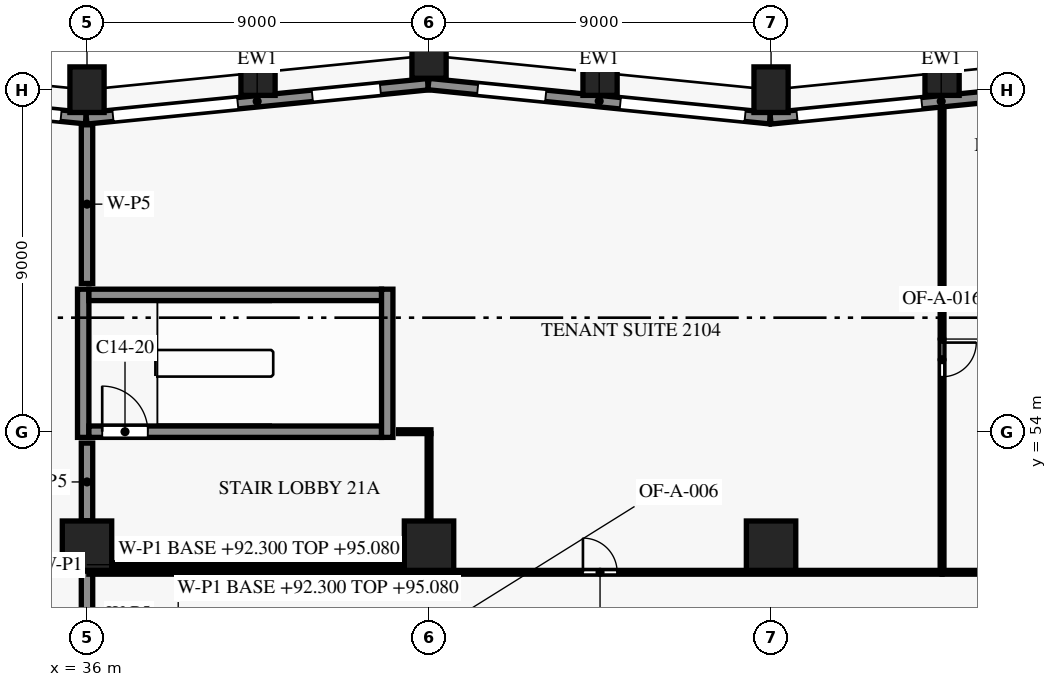
"""IFC4 building model, lengths in metres.
Left out: names, types, materials, properties, quantities, classifications, styles, units other than length and angle.
Written with IfcOpenShell. Run it as: python <this file> out.ifc"""

import sys

from ifc_helpers import new_model, si_unit, direction, frame, frame_2d, origin, origin_2d, place, context, subcontext, project, spatial, rectangle, extrude, element, fill, save


model = new_model("IFC4")
c1 = context("Model", 3, precision=1e-05, world=origin(), true_north=direction((0.0, 1.0)))
c2 = subcontext(c1, "Body", "Model", "MODEL_VIEW")
j1 = project(units=[si_unit("LENGTHUNIT", "METRE"), si_unit("PLANEANGLEUNIT", "RADIAN")], contexts=[c1])
p1 = place(None, origin())
s1 = spatial("IfcSite", under=j1, at=p1, CompositionType="ELEMENT")
p2 = place(p1, origin())
s2 = spatial("IfcBuilding", under=s1, at=p2, CompositionType="ELEMENT")
p3 = place(p2, frame((0.0, 0.0, 92.3)))
s3 = spatial("IfcBuildingStorey", under=s2, at=p3, CompositionType="ELEMENT", Elevation=92.3)
for number, where, z_axis, x_axis in (
    (1, (58.5, 63.45, 0.0), (0.0, 0.0, 1.0), (-0.995, -0.1, 0.0)),
    (2, (54.0, 63.0, 0.0), (0.0, 0.0, 1.0), (-1.0, 0.0, 0.0)),
    (3, (49.5, 63.45, 0.0), (0.0, 0.0, 1.0), (-0.995, 0.1, 0.0)),
    (4, (45.0, 63.9, 0.0), (0.0, 0.0, 1.0), (-1.0, 0.0, 0.0)),
    (5, (40.5, 63.45, 0.0), (0.0, 0.0, 1.0), (-0.995, -0.1, 0.0)),
    (6, (36.0, 63.0, 0.0), (0.0, 0.0, 1.0), (-1.0, 0.0, 0.0)),
):
    element("IfcColumn", number, at=place(p3, frame(where, z_axis=z_axis, x_axis=x_axis)), inside=s3, PredefinedType="COLUMN", context=c2, shape_type="SweptSolid", body=[
        extrude(rectangle(XDim=0.9, YDim=1.2, at=origin_2d()), origin(), (0.0, 0.0, 1.0), 3.8),
    ])
for number, where, z_axis, x_axis in (
    (7, (36.0, 51.0, 0.0), (0.0, 0.0, 1.0), (1.0, 0.0, 0.0)),
    (8, (45.0, 51.0, 0.0), (0.0, 0.0, 1.0), (1.0, 0.0, 0.0)),
    (9, (54.0, 51.0, 0.0), (0.0, 0.0, 1.0), (1.0, 0.0, 0.0)),
):
    element("IfcColumn", number, at=place(p3, frame(where, z_axis=z_axis, x_axis=x_axis)), inside=s3, PredefinedType="COLUMN", context=c2, shape_type="SweptSolid", body=[
        extrude(rectangle(XDim=1.3, YDim=1.3, at=origin_2d()), origin(), (0.0, 0.0, 1.0), 3.8),
    ])
p4 = place(p3, frame((53.985, 62.245, 0.0), z_axis=(0.0, 0.0, 1.0), x_axis=(0.995037993253, 0.099495688264, 0.0)))
e10 = element("IfcWall", 10, at=p4, inside=s3, PredefinedType="SOLIDWALL", context=c2, shape_type="SweptSolid", body=[
    extrude(rectangle(XDim=9.03, YDim=0.3, at=frame_2d((4.515, 0.0))), origin(), (0.0, 0.0, 1.0), 3.15),
])
p5 = place(p4, frame((0.701, 0.0, 0.15)))
e11 = element("IfcOpeningElement", 11, at=p5, cuts=e10, PredefinedType="OPENING", context=c2, shape_type="SweptSolid", body=[
    extrude(rectangle(XDim=3.3, YDim=2.4, at=frame_2d((1.65, 1.2))), frame((0.0, 0.16, 0.0), z_axis=(0.0, -1.0, 0.0), x_axis=(1.0, 0.0, 0.0)), (0.0, 0.0, 1.0), 0.32),
])
p6 = place(p4, frame((5.974, 0.0, 0.75)))
e12 = element("IfcOpeningElement", 12, at=p6, cuts=e10, PredefinedType="OPENING", context=c2, shape_type="SweptSolid", body=[
    extrude(rectangle(XDim=1.8, YDim=1.8, at=frame_2d((0.9, 0.9))), frame((0.0, 0.16, 0.0), z_axis=(0.0, -1.0, 0.0), x_axis=(1.0, 0.0, 0.0)), (0.0, 0.0, 1.0), 0.32),
])
p7 = place(p3, frame((44.985, 63.148, 0.0), z_axis=(0.0, 0.0, 1.0), x_axis=(0.995037993253, -0.099495688264, 0.0)))
e13 = element("IfcWall", 13, at=p7, inside=s3, PredefinedType="SOLIDWALL", context=c2, shape_type="SweptSolid", body=[
    extrude(rectangle(XDim=9.03, YDim=0.3, at=frame_2d((4.515, 0.0))), origin(), (0.0, 0.0, 1.0), 3.15),
])
p8 = place(p7, frame((1.301, 0.0, 0.75)))
e14 = element("IfcOpeningElement", 14, at=p8, cuts=e13, PredefinedType="OPENING", context=c2, shape_type="SweptSolid", body=[
    extrude(rectangle(XDim=1.8, YDim=1.8, at=frame_2d((0.9, 0.9))), frame((0.0, 0.16, 0.0), z_axis=(0.0, -1.0, 0.0), x_axis=(1.0, 0.0, 0.0)), (0.0, 0.0, 1.0), 0.32),
])
p9 = place(p7, frame((5.073, 0.0, 0.15)))
e15 = element("IfcOpeningElement", 15, at=p9, cuts=e13, PredefinedType="OPENING", context=c2, shape_type="SweptSolid", body=[
    extrude(rectangle(XDim=3.3, YDim=2.4, at=frame_2d((1.65, 1.2))), frame((0.0, 0.16, 0.0), z_axis=(0.0, -1.0, 0.0), x_axis=(1.0, 0.0, 0.0)), (0.0, 0.0, 1.0), 0.32),
])
p10 = place(p3, frame((35.985, 62.245, 0.0), z_axis=(0.0, 0.0, 1.0), x_axis=(0.995037993253, 0.099495688264, 0.0)))
e16 = element("IfcWall", 16, at=p10, inside=s3, PredefinedType="SOLIDWALL", context=c2, shape_type="SweptSolid", body=[
    extrude(rectangle(XDim=9.03, YDim=0.3, at=frame_2d((4.515, 0.0))), origin(), (0.0, 0.0, 1.0), 3.15),
])
p11 = place(p10, frame((0.701, 0.0, 0.15)))
e17 = element("IfcOpeningElement", 17, at=p11, cuts=e16, PredefinedType="OPENING", context=c2, shape_type="SweptSolid", body=[
    extrude(rectangle(XDim=3.3, YDim=2.4, at=frame_2d((1.65, 1.2))), frame((0.0, 0.16, 0.0), z_axis=(0.0, -1.0, 0.0), x_axis=(1.0, 0.0, 0.0)), (0.0, 0.0, 1.0), 0.32),
])
p12 = place(p10, frame((5.974, 0.0, 0.75)))
e18 = element("IfcOpeningElement", 18, at=p12, cuts=e16, PredefinedType="OPENING", context=c2, shape_type="SweptSolid", body=[
    extrude(rectangle(XDim=1.8, YDim=1.8, at=frame_2d((0.9, 0.9))), frame((0.0, 0.16, 0.0), z_axis=(0.0, -1.0, 0.0), x_axis=(1.0, 0.0, 0.0)), (0.0, 0.0, 1.0), 0.32),
])
p13 = place(p3, frame((27.075, 63.139, 0.0), z_axis=(0.0, 0.0, 1.0), x_axis=(0.995036108601, -0.099514534519, 0.0)))
e19 = element("IfcWall", 19, at=p13, inside=s3, PredefinedType="SOLIDWALL", context=c2, shape_type="SweptSolid", body=[
    extrude(rectangle(XDim=8.94, YDim=0.3, at=frame_2d((4.47, 0.0))), origin(), (0.0, 0.0, 1.0), 3.15),
])
p14 = place(p13, frame((1.211, 0.0, 0.75)))
e20 = element("IfcOpeningElement", 20, at=p14, cuts=e19, PredefinedType="OPENING", context=c2, shape_type="SweptSolid", body=[
    extrude(rectangle(XDim=1.8, YDim=1.8, at=frame_2d((0.9, 0.9))), frame((0.0, 0.16, 0.0), z_axis=(0.0, -1.0, 0.0), x_axis=(1.0, 0.0, 0.0)), (0.0, 0.0, 1.0), 0.32),
])
p15 = place(p13, frame((4.984, 0.0, 0.15)))
e21 = element("IfcOpeningElement", 21, at=p15, cuts=e19, PredefinedType="OPENING", context=c2, shape_type="SweptSolid", body=[
    extrude(rectangle(XDim=3.3, YDim=2.4, at=frame_2d((1.65, 1.2))), frame((0.0, 0.16, 0.0), z_axis=(0.0, -1.0, 0.0), x_axis=(1.0, 0.0, 0.0)), (0.0, 0.0, 1.0), 0.32),
])
p16 = place(p3, frame((36.05, 54.0, 0.0), z_axis=(0.0, 0.0, 1.0), x_axis=(1.0, 0.0, 0.0)))
e22 = element("IfcWall", 22, at=p16, inside=s3, PredefinedType="SHEAR", context=c2, shape_type="SweptSolid", body=[
    extrude(rectangle(XDim=7.7, YDim=0.3, at=frame_2d((3.85, 0.0))), origin(), (0.0, 0.0, 1.0), 3.5),
])
p17 = place(p16, frame((0.35, 0.0, 0.0)))
e23 = element("IfcOpeningElement", 23, at=p17, cuts=e22, PredefinedType="OPENING", context=c2, shape_type="SweptSolid", body=[
    extrude(rectangle(XDim=1.2, YDim=2.2, at=frame_2d((0.6, 1.1))), frame((0.0, 0.16, 0.0), z_axis=(0.0, -1.0, 0.0), x_axis=(1.0, 0.0, 0.0)), (0.0, 0.0, 1.0), 0.32),
])
p18 = place(p3, frame((36.05, 57.6, 0.0), z_axis=(0.0, 0.0, 1.0), x_axis=(1.0, 0.0, 0.0)))
e24 = element("IfcWall", 24, at=p18, inside=s3, PredefinedType="SHEAR", context=c2, shape_type="SweptSolid", body=[
    extrude(rectangle(XDim=7.7, YDim=0.3, at=frame_2d((3.85, 0.0))), origin(), (0.0, 0.0, 1.0), 3.5),
])
for number, where, z_axis, x_axis in (
    (25, (35.9, 53.85, 0.0), (0.0, 0.0, 1.0), (0.0, 1.0, 0.0)),
    (26, (43.9, 53.85, 0.0), (0.0, 0.0, 1.0), (0.0, 1.0, 0.0)),
):
    element("IfcWall", number, at=place(p3, frame(where, z_axis=z_axis, x_axis=x_axis)), inside=s3, PredefinedType="SHEAR", context=c2, shape_type="SweptSolid", body=[
        extrude(rectangle(XDim=3.9, YDim=0.3, at=frame_2d((1.95, 0.0))), origin(), (0.0, 0.0, 1.0), 3.5),
    ])
p19 = place(p3, frame((36.0, 48.05, 0.0), z_axis=(0.0, 0.0, 1.0), x_axis=(0.0, 1.0, 0.0)))
e27 = element("IfcWall", 27, at=p19, inside=s3, PredefinedType="PARTITIONING", context=c2, shape_type="SweptSolid", body=[
    extrude(rectangle(XDim=2.28, YDim=0.3, at=frame_2d((1.14, 0.0))), origin(), (0.0, 0.0, 1.0), 2.78),
])
p20 = place(p3, frame((36.05, 50.3, 0.0), z_axis=(0.0, 0.0, 1.0), x_axis=(1.0, 0.0, 0.0)))
e28 = element("IfcWall", 28, at=p20, inside=s3, PredefinedType="PARTITIONING", context=c2, shape_type="SweptSolid", body=[
    extrude(rectangle(XDim=8.95, YDim=0.1, at=frame_2d((4.475, 0.0))), origin(), (0.0, 0.0, 1.0), 2.78),
])
p21 = place(p3, frame((45.0, 50.3, 0.0), z_axis=(0.0, 0.0, 1.0), x_axis=(1.0, 0.0, 0.0)))
e29 = element("IfcWall", 29, at=p21, inside=s3, PredefinedType="PARTITIONING", context=c2, shape_type="SweptSolid", body=[
    extrude(rectangle(XDim=13.5, YDim=0.1, at=frame_2d((6.75, 0.0))), origin(), (0.0, 0.0, 1.0), 2.88),
])
p22 = place(p21, frame((4.05, 0.0, 0.0)))
e30 = element("IfcOpeningElement", 30, at=p22, cuts=e29, PredefinedType="OPENING", context=c2, shape_type="SweptSolid", body=[
    extrude(rectangle(XDim=0.9, YDim=2.1, at=frame_2d((0.45, 1.05))), frame((0.0, 0.06, 0.0), z_axis=(0.0, -1.0, 0.0), x_axis=(1.0, 0.0, 0.0)), (0.0, 0.0, 1.0), 0.12),
])
p23 = place(p3, frame((58.5, 50.3, 0.0), z_axis=(0.0, 0.0, 1.0), x_axis=(1.0, 0.0, 0.0)))
e31 = element("IfcWall", 31, at=p23, inside=s3, PredefinedType="PARTITIONING", context=c2, shape_type="SweptSolid", body=[
    extrude(rectangle(XDim=4.5, YDim=0.1, at=frame_2d((2.25, 0.0))), origin(), (0.0, 0.0, 1.0), 2.88),
])
p24 = place(p3, frame((44.345, 50.5, 0.0), z_axis=(0.0, 0.0, 1.0), x_axis=(-1.0, 0.0, 0.0)))
e32 = element("IfcWall", 32, at=p24, inside=s3, PredefinedType="PARTITIONING", context=c2, shape_type="SweptSolid", body=[
    extrude(rectangle(XDim=7.69, YDim=0.1, at=frame_2d((3.845, 0.0))), origin(), (0.0, 0.0, 1.0), 3.48),
])
p25 = place(p3, frame((36.0, 51.655, 0.0), z_axis=(0.0, 0.0, 1.0), x_axis=(0.0, 1.0, 0.0)))
e33 = element("IfcWall", 33, at=p25, inside=s3, PredefinedType="PARTITIONING", context=c2, shape_type="SweptSolid", body=[
    extrude(rectangle(XDim=2.045, YDim=0.3, at=frame_2d((1.022, 0.0))), origin(), (0.0, 0.0, 1.0), 2.78),
])
p26 = place(p3, frame((45.0, 53.95, 0.0), z_axis=(0.0, 0.0, 1.0), x_axis=(0.0, -1.0, 0.0)))
e34 = element("IfcWall", 34, at=p26, inside=s3, PredefinedType="PARTITIONING", context=c2, shape_type="SweptSolid", body=[
    extrude(rectangle(XDim=2.295, YDim=0.1, at=frame_2d((1.147, 0.0))), origin(), (0.0, 0.0, 1.0), 2.88),
])
p27 = place(p3, frame((44.2, 54.0, 0.0), z_axis=(0.0, 0.0, 1.0), x_axis=(1.0, 0.0, 0.0)))
e35 = element("IfcWall", 35, at=p27, inside=s3, PredefinedType="PARTITIONING", context=c2, shape_type="SweptSolid", body=[
    extrude(rectangle(XDim=0.85, YDim=0.1, at=frame_2d((0.425, 0.0))), origin(), (0.0, 0.0, 1.0), 2.88),
])
p28 = place(p3, frame((36.0, 57.9, 0.0), z_axis=(0.0, 0.0, 1.0), x_axis=(0.0, 1.0, 0.0)))
e36 = element("IfcWall", 36, at=p28, inside=s3, PredefinedType="PARTITIONING", context=c2, shape_type="SweptSolid", body=[
    extrude(rectangle(XDim=4.176, YDim=0.3, at=frame_2d((2.088, 0.0))), origin(), (0.0, 0.0, 1.0), 2.78),
])
p29 = place(p3, frame((58.5, 62.525, 0.0), z_axis=(0.0, 0.0, 1.0), x_axis=(0.0, -1.0, 0.0)))
e37 = element("IfcWall", 37, at=p29, inside=s3, PredefinedType="PARTITIONING", context=c2, shape_type="SweptSolid", body=[
    extrude(rectangle(XDim=12.175, YDim=0.1, at=frame_2d((6.088, 0.0))), origin(), (0.0, 0.0, 1.0), 2.78),
])
p30 = place(p29, frame((6.18, 0.0, 0.0)))
e38 = element("IfcOpeningElement", 38, at=p30, cuts=e37, PredefinedType="OPENING", context=c2, shape_type="SweptSolid", body=[
    extrude(rectangle(XDim=0.9, YDim=2.1, at=frame_2d((0.45, 1.05))), frame((0.0, 0.06, 0.0), z_axis=(0.0, -1.0, 0.0), x_axis=(1.0, 0.0, 0.0)), (0.0, 0.0, 1.0), 0.12),
])
p31 = place(p5, origin())
e39 = element("IfcWindow", 39, at=p31, inside=s3, PartitioningType="SINGLE_PANEL", PredefinedType="WINDOW", context=c2, shape_type="SweptSolid", body=[
    extrude(rectangle(XDim=3.3, YDim=2.4, at=frame_2d((1.65, 1.2))), frame((0.0, 0.03, 0.0), z_axis=(0.0, -1.0, 0.0), x_axis=(1.0, 0.0, 0.0)), (0.0, 0.0, 1.0), 0.06),
])
fill(e11, e39)
p32 = place(p8, origin())
e40 = element("IfcWindow", 40, at=p32, inside=s3, PartitioningType="SINGLE_PANEL", PredefinedType="WINDOW", context=c2, shape_type="SweptSolid", body=[
    extrude(rectangle(XDim=1.8, YDim=1.8, at=frame_2d((0.9, 0.9))), frame((0.0, 0.03, 0.0), z_axis=(0.0, -1.0, 0.0), x_axis=(1.0, 0.0, 0.0)), (0.0, 0.0, 1.0), 0.06),
])
fill(e14, e40)
p33 = place(p9, origin())
e41 = element("IfcWindow", 41, at=p33, inside=s3, PartitioningType="SINGLE_PANEL", PredefinedType="WINDOW", context=c2, shape_type="SweptSolid", body=[
    extrude(rectangle(XDim=3.3, YDim=2.4, at=frame_2d((1.65, 1.2))), frame((0.0, 0.03, 0.0), z_axis=(0.0, -1.0, 0.0), x_axis=(1.0, 0.0, 0.0)), (0.0, 0.0, 1.0), 0.06),
])
fill(e15, e41)
p34 = place(p11, origin())
e42 = element("IfcWindow", 42, at=p34, inside=s3, PartitioningType="SINGLE_PANEL", PredefinedType="WINDOW", context=c2, shape_type="SweptSolid", body=[
    extrude(rectangle(XDim=3.3, YDim=2.4, at=frame_2d((1.65, 1.2))), frame((0.0, 0.03, 0.0), z_axis=(0.0, -1.0, 0.0), x_axis=(1.0, 0.0, 0.0)), (0.0, 0.0, 1.0), 0.06),
])
fill(e17, e42)
p35 = place(p12, origin())
e43 = element("IfcWindow", 43, at=p35, inside=s3, PartitioningType="SINGLE_PANEL", PredefinedType="WINDOW", context=c2, shape_type="SweptSolid", body=[
    extrude(rectangle(XDim=1.8, YDim=1.8, at=frame_2d((0.9, 0.9))), frame((0.0, 0.03, 0.0), z_axis=(0.0, -1.0, 0.0), x_axis=(1.0, 0.0, 0.0)), (0.0, 0.0, 1.0), 0.06),
])
fill(e18, e43)
p36 = place(p15, origin())
e44 = element("IfcWindow", 44, at=p36, inside=s3, PartitioningType="SINGLE_PANEL", PredefinedType="WINDOW", context=c2, shape_type="SweptSolid", body=[
    extrude(rectangle(XDim=3.3, YDim=2.4, at=frame_2d((1.65, 1.2))), frame((0.0, 0.03, 0.0), z_axis=(0.0, -1.0, 0.0), x_axis=(1.0, 0.0, 0.0)), (0.0, 0.0, 1.0), 0.06),
])
fill(e21, e44)
p37 = place(p17, origin())
e45 = element("IfcDoor", 45, at=p37, inside=s3, OperationType="SINGLE_SWING_LEFT", PredefinedType="DOOR", context=c2, shape_type="SweptSolid", body=[
    extrude(rectangle(XDim=1.2, YDim=2.2, at=frame_2d((0.6, 1.1))), frame((0.0, 0.025, 0.0), z_axis=(0.0, -1.0, 0.0), x_axis=(1.0, 0.0, 0.0)), (0.0, 0.0, 1.0), 0.05),
])
fill(e23, e45)
p38 = place(p22, origin())
e46 = element("IfcDoor", 46, at=p38, inside=s3, OperationType="SINGLE_SWING_LEFT", PredefinedType="DOOR", context=c2, shape_type="SweptSolid", body=[
    extrude(rectangle(XDim=0.9, YDim=2.1, at=frame_2d((0.45, 1.05))), frame((0.0, 0.025, 0.0), z_axis=(0.0, -1.0, 0.0), x_axis=(1.0, 0.0, 0.0)), (0.0, 0.0, 1.0), 0.05),
])
fill(e30, e46)
p39 = place(p30, origin())
e47 = element("IfcDoor", 47, at=p39, inside=s3, OperationType="SINGLE_SWING_LEFT", PredefinedType="DOOR", context=c2, shape_type="SweptSolid", body=[
    extrude(rectangle(XDim=0.9, YDim=2.1, at=frame_2d((0.45, 1.05))), frame((0.0, 0.025, 0.0), z_axis=(0.0, -1.0, 0.0), x_axis=(1.0, 0.0, 0.0)), (0.0, 0.0, 1.0), 0.05),
])
fill(e38, e47)
save(model, sys.argv[1])
